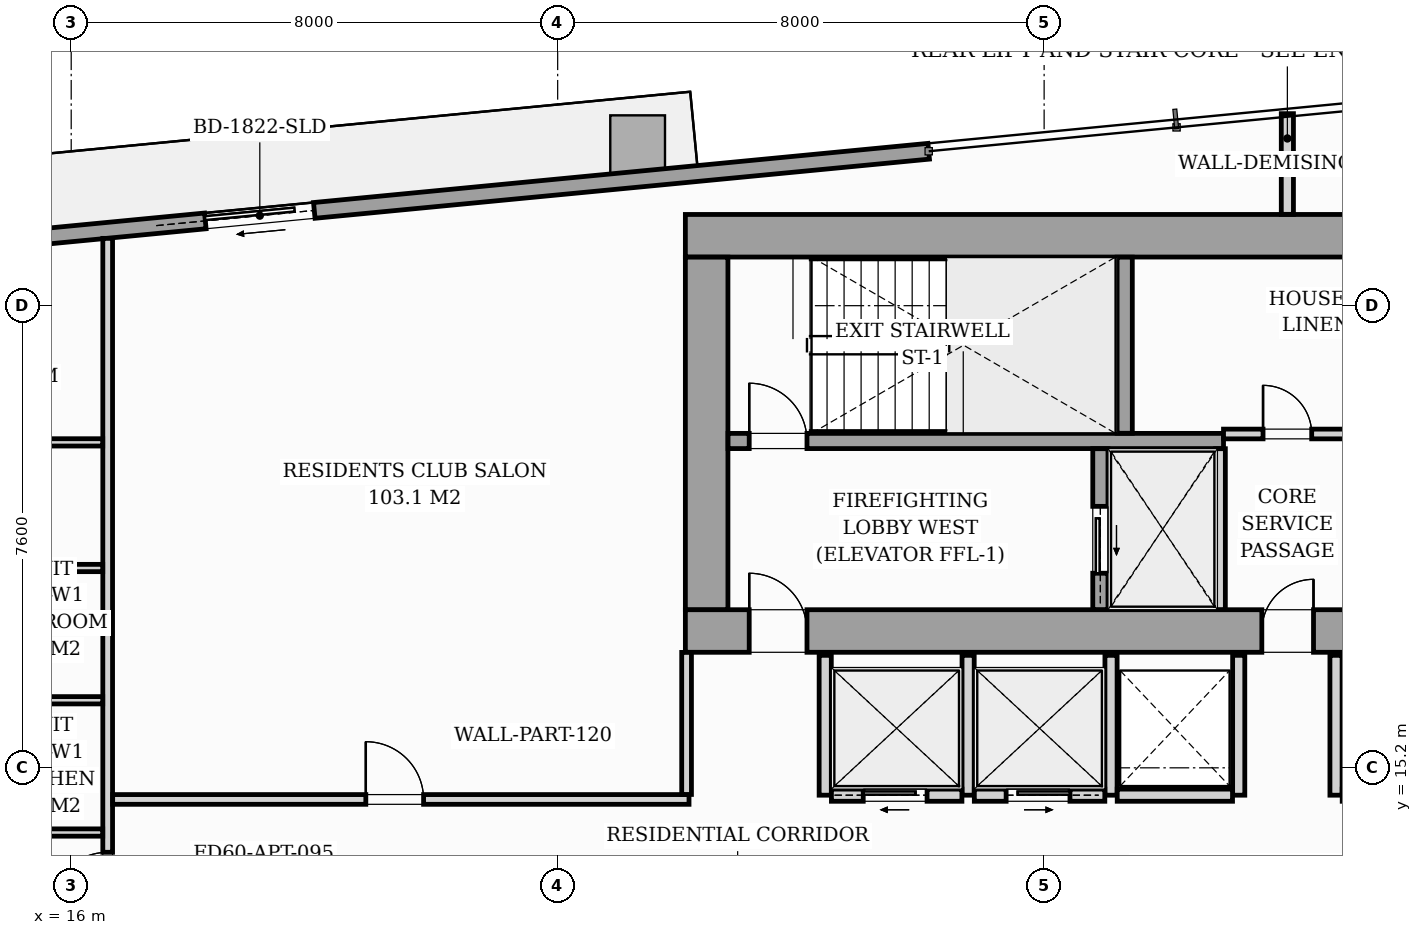
"""IFC4 building model, lengths in metres.
Left out: names, types, materials, properties, quantities, classifications, styles, units other than length and angle.
Written with IfcOpenShell. Run it as: python <this file> out.ifc"""

import sys

from ifc_helpers import new_model, si_unit, direction, frame, frame_2d, origin, origin_2d, place, context, subcontext, project, spatial, rectangle, i_section, extrude, source, transform, mapped, element, fill, save


model = new_model("IFC4")
c1 = context("Model", 3, precision=1e-05, world=origin(), true_north=direction((0.0, 1.0)))
c2 = subcontext(c1, "Body", "Model", "MODEL_VIEW")
j1 = project(units=[si_unit("LENGTHUNIT", "METRE"), si_unit("PLANEANGLEUNIT", "RADIAN")], contexts=[c1])
p1 = place(None, origin())
s1 = spatial("IfcSite", under=j1, at=p1, CompositionType="ELEMENT")
p2 = place(p1, origin())
s2 = spatial("IfcBuilding", under=s1, at=p2, CompositionType="ELEMENT")
p3 = place(p2, frame((0.0, 0.0, 81.0)))
s3 = spatial("IfcBuildingStorey", under=s2, at=p3, CompositionType="ELEMENT", Elevation=81.0)
m1 = source(origin(), c2, "Body", "SweptSolid", [
    extrude(i_section(OverallWidth=0.427, OverallDepth=0.483, WebThickness=0.051, FlangeThickness=0.082, FilletRadius=0.018, at=origin_2d()), origin(), (0.0, 0.0, 1.0), 3.196),
])
for number, where, z_axis, x_axis in (
    (1, (26.4, 17.4, 0.002), (0.0, 0.0, 1.0), (1.0, 0.0, 0.0)),
    (2, (33.12, 17.4, 0.002), (0.0, 0.0, 1.0), (1.0, 0.0, 0.0)),
    (3, (26.4, 24.0, 0.002), (0.0, 0.0, 1.0), (1.0, 0.0, 0.0)),
    (4, (33.12, 24.0, 0.002), (0.0, 0.0, 1.0), (1.0, 0.0, 0.0)),
):
    element("IfcColumn", number, at=place(p3, frame(where, z_axis=z_axis, x_axis=x_axis)), inside=s3, PredefinedType="PILASTER", context=c2, shape_type="MappedRepresentation", body=[
        mapped(m1, transform((0.0, 0.0, 0.0), scale=1.0)),
    ])
m2 = source(origin(), c2, "Body", "SweptSolid", [
    extrude(rectangle(XDim=0.9, YDim=1.1, at=origin_2d()), origin(), (0.0, 0.0, 1.0), 3.196),
])
p4 = place(p3, frame((25.315, 25.38, 0.002), z_axis=(0.0, 0.0, 1.0), x_axis=(0.995396198367, 0.09584575252, 0.0)))
e5 = element("IfcColumn", 5, at=p4, inside=s3, PredefinedType="COLUMN", context=c2, shape_type="MappedRepresentation", body=[
    mapped(m2, transform((0.0, 0.0, 0.0), scale=1.0)),
])
p5 = place(p3, frame((11.08, 23.508, 0.0), z_axis=(0.0, 0.0, 1.0), x_axis=(0.995396638587, 0.095841180552, 0.0)))
e6 = element("IfcWall", 6, at=p5, inside=s3, PredefinedType="STANDARD", context=c2, shape_type="SweptSolid", body=[
    extrude(rectangle(XDim=19.11, YDim=0.26, at=frame_2d((9.555, 0.0))), origin(), (0.0, 0.0, 1.0), 2.94),
])
p6 = place(p5, frame((7.159, 0.0, 0.0)))
e7 = element("IfcOpeningElement", 7, at=p6, cuts=e6, PredefinedType="OPENING", context=c2, shape_type="SweptSolid", body=[
    extrude(rectangle(XDim=1.8, YDim=2.06, at=frame_2d((0.9, 1.03))), frame((0.0, 0.14, 0.0), z_axis=(0.0, -1.0, 0.0), x_axis=(1.0, 0.0, 0.0)), (0.0, 0.0, 1.0), 0.28),
])
p7 = place(p5, frame((2.05, 0.0, 0.65)))
e8 = element("IfcOpeningElement", 8, at=p7, cuts=e6, PredefinedType="OPENING", context=c2, shape_type="SweptSolid", body=[
    extrude(rectangle(XDim=1.6, YDim=1.5, at=frame_2d((0.8, 0.75))), frame((0.0, 0.14, 0.0), z_axis=(0.0, -1.0, 0.0), x_axis=(1.0, 0.0, 0.0)), (0.0, 0.0, 1.0), 0.28),
])
p8 = place(p3, frame((26.1, 17.45, 0.0), z_axis=(0.0, 0.0, 1.0), x_axis=(1.0, 0.0, 0.0)))
e9 = element("IfcWall", 9, at=p8, inside=s3, PredefinedType="SHEAR", context=c2, shape_type="SweptSolid", body=[
    extrude(rectangle(XDim=19.8, YDim=0.7, at=frame_2d((9.9, 0.0))), origin(), (0.0, 0.0, 1.0), 3.2),
])
p9 = place(p8, frame((1.05, 0.0, 0.0)))
e10 = element("IfcOpeningElement", 10, at=p9, cuts=e9, PredefinedType="OPENING", context=c2, shape_type="SweptSolid", body=[
    extrude(rectangle(XDim=0.95, YDim=2.06, at=frame_2d((0.475, 1.03))), frame((0.0, 0.36, 0.0), z_axis=(0.0, -1.0, 0.0), x_axis=(1.0, 0.0, 0.0)), (0.0, 0.0, 1.0), 0.72),
])
p10 = place(p8, frame((9.48, 0.0, 0.0)))
e11 = element("IfcOpeningElement", 11, at=p10, cuts=e9, PredefinedType="OPENING", context=c2, shape_type="SweptSolid", body=[
    extrude(rectangle(XDim=0.85, YDim=2.0, at=frame_2d((0.425, 1.0))), frame((0.0, 0.36, 0.0), z_axis=(0.0, -1.0, 0.0), x_axis=(1.0, 0.0, 0.0)), (0.0, 0.0, 1.0), 0.72),
])
p11 = place(p8, frame((17.65, 0.0, 0.0)))
e12 = element("IfcOpeningElement", 12, at=p11, cuts=e9, PredefinedType="OPENING", context=c2, shape_type="SweptSolid", body=[
    extrude(rectangle(XDim=0.95, YDim=2.06, at=frame_2d((0.475, 1.03))), frame((0.0, 0.36, 0.0), z_axis=(0.0, -1.0, 0.0), x_axis=(1.0, 0.0, 0.0)), (0.0, 0.0, 1.0), 0.72),
])
p12 = place(p3, frame((26.1, 23.95, 0.0), z_axis=(0.0, 0.0, 1.0), x_axis=(1.0, 0.0, 0.0)))
e13 = element("IfcWall", 13, at=p12, inside=s3, PredefinedType="SHEAR", context=c2, shape_type="SweptSolid", body=[
    extrude(rectangle(XDim=19.8, YDim=0.7, at=frame_2d((9.9, 0.0))), origin(), (0.0, 0.0, 1.0), 3.2),
])
p13 = place(p3, frame((26.45, 17.802, 0.0), z_axis=(0.0, 0.0, 1.0), x_axis=(0.0, 1.0, 0.0)))
e14 = element("IfcWall", 14, at=p13, inside=s3, PredefinedType="SHEAR", context=c2, shape_type="SweptSolid", body=[
    extrude(rectangle(XDim=5.796, YDim=0.7, at=frame_2d((2.898, 0.0))), origin(), (0.0, 0.0, 1.0), 3.2),
])
p14 = place(p3, frame((26.802, 20.575, 0.0), z_axis=(0.0, 0.0, 1.0), x_axis=(1.0, 0.0, 0.0)))
e15 = element("IfcWall", 15, at=p14, inside=s3, PredefinedType="SOLIDWALL", context=c2, shape_type="SweptSolid", body=[
    extrude(rectangle(XDim=8.148, YDim=0.25, at=frame_2d((4.074, 0.0))), origin(), (0.0, 0.0, 1.0), 3.2),
])
p15 = place(p14, frame((0.348, 0.0, 0.0)))
e16 = element("IfcOpeningElement", 16, at=p15, cuts=e15, PredefinedType="OPENING", context=c2, shape_type="SweptSolid", body=[
    extrude(rectangle(XDim=0.95, YDim=2.06, at=frame_2d((0.475, 1.03))), frame((0.0, 0.135, 0.0), z_axis=(0.0, -1.0, 0.0), x_axis=(1.0, 0.0, 0.0)), (0.0, 0.0, 1.0), 0.27),
])
p16 = place(p3, frame((33.325, 20.702, 0.0), z_axis=(0.0, 0.0, 1.0), x_axis=(0.0, 1.0, 0.0)))
e17 = element("IfcWall", 17, at=p16, inside=s3, PredefinedType="SOLIDWALL", context=c2, shape_type="SweptSolid", body=[
    extrude(rectangle(XDim=2.896, YDim=0.25, at=frame_2d((1.448, 0.0))), origin(), (0.0, 0.0, 1.0), 3.2),
])
p17 = place(p3, frame((32.925, 17.802, 0.0), z_axis=(0.0, 0.0, 1.0), x_axis=(0.0, 1.0, 0.0)))
e18 = element("IfcWall", 18, at=p17, inside=s3, PredefinedType="SOLIDWALL", context=c2, shape_type="SweptSolid", body=[
    extrude(rectangle(XDim=2.646, YDim=0.25, at=frame_2d((1.323, 0.0))), origin(), (0.0, 0.0, 1.0), 3.2),
])
p18 = place(p17, frame((0.598, 0.0, 0.0)))
e19 = element("IfcOpeningElement", 19, at=p18, cuts=e18, PredefinedType="OPENING", context=c2, shape_type="SweptSolid", body=[
    extrude(rectangle(XDim=1.1, YDim=2.08, at=frame_2d((0.55, 1.04))), frame((0.0, 0.135, 0.0), z_axis=(0.0, -1.0, 0.0), x_axis=(1.0, 0.0, 0.0)), (0.0, 0.0, 1.0), 0.27),
])
p19 = place(p3, frame((34.9, 17.802, 0.0), z_axis=(0.0, 0.0, 1.0), x_axis=(0.0, 1.0, 0.0)))
e20 = element("IfcWall", 20, at=p19, inside=s3, PredefinedType="PARTITIONING", context=c2, shape_type="SweptSolid", body=[
    extrude(rectangle(XDim=2.646, YDim=0.16, at=frame_2d((1.323, 0.0))), origin(), (0.0, 0.0, 1.0), 2.94),
])
p20 = place(p3, frame((34.95, 20.69, 0.0), z_axis=(0.0, 0.0, 1.0), x_axis=(1.0, 0.0, 0.0)))
e21 = element("IfcWall", 21, at=p20, inside=s3, PredefinedType="PARTITIONING", context=c2, shape_type="SweptSolid", body=[
    extrude(rectangle(XDim=2.1, YDim=0.16, at=frame_2d((1.05, 0.0))), origin(), (0.0, 0.0, 1.0), 2.94),
])
p21 = place(p20, frame((0.65, 0.0, 0.0)))
e22 = element("IfcOpeningElement", 22, at=p21, cuts=e21, PredefinedType="OPENING", context=c2, shape_type="SweptSolid", body=[
    extrude(rectangle(XDim=0.8, YDim=2.05, at=frame_2d((0.4, 1.025))), frame((0.0, 0.09, 0.0), z_axis=(0.0, -1.0, 0.0), x_axis=(1.0, 0.0, 0.0)), (0.0, 0.0, 1.0), 0.18),
])
for number, where, z_axis, x_axis in (
    (23, (28.4, 14.75, 0.0), (0.0, 0.0, 1.0), (0.0, 1.0, 0.0)),
    (24, (30.75, 14.75, 0.0), (0.0, 0.0, 1.0), (0.0, 1.0, 0.0)),
    (25, (33.1, 14.75, 0.0), (0.0, 0.0, 1.0), (0.0, 1.0, 0.0)),
):
    element("IfcWall", number, at=place(p3, frame(where, z_axis=z_axis, x_axis=x_axis)), inside=s3, PredefinedType="PARTITIONING", context=c2, shape_type="SweptSolid", body=[
        extrude(rectangle(XDim=2.3, YDim=0.2, at=frame_2d((1.15, 0.0))), origin(), (0.0, 0.0, 1.0), 2.94),
    ])
p22 = place(p3, frame((28.502, 14.75, 0.0), z_axis=(0.0, 0.0, 1.0), x_axis=(1.0, 0.0, 0.0)))
e26 = element("IfcWall", 26, at=p22, inside=s3, PredefinedType="PARTITIONING", context=c2, shape_type="SweptSolid", body=[
    extrude(rectangle(XDim=2.146, YDim=0.2, at=frame_2d((1.073, 0.0))), origin(), (0.0, 0.0, 1.0), 2.94),
])
p23 = place(p22, frame((0.523, 0.0, 0.0)))
e27 = element("IfcOpeningElement", 27, at=p23, cuts=e26, PredefinedType="OPENING", context=c2, shape_type="SweptSolid", body=[
    extrude(rectangle(XDim=1.05, YDim=2.08, at=frame_2d((0.525, 1.04))), frame((0.0, 0.11, 0.0), z_axis=(0.0, -1.0, 0.0), x_axis=(1.0, 0.0, 0.0)), (0.0, 0.0, 1.0), 0.22),
])
p24 = place(p3, frame((30.852, 14.75, 0.0), z_axis=(0.0, 0.0, 1.0), x_axis=(1.0, 0.0, 0.0)))
e28 = element("IfcWall", 28, at=p24, inside=s3, PredefinedType="PARTITIONING", context=c2, shape_type="SweptSolid", body=[
    extrude(rectangle(XDim=2.146, YDim=0.2, at=frame_2d((1.073, 0.0))), origin(), (0.0, 0.0, 1.0), 2.94),
])
p25 = place(p24, frame((0.523, 0.0, 0.0)))
e29 = element("IfcOpeningElement", 29, at=p25, cuts=e28, PredefinedType="OPENING", context=c2, shape_type="SweptSolid", body=[
    extrude(rectangle(XDim=1.05, YDim=2.08, at=frame_2d((0.525, 1.04))), frame((0.0, 0.11, 0.0), z_axis=(0.0, -1.0, 0.0), x_axis=(1.0, 0.0, 0.0)), (0.0, 0.0, 1.0), 0.22),
])
p26 = place(p3, frame((35.2, 14.75, 0.0), z_axis=(0.0, 0.0, 1.0), x_axis=(0.0, 1.0, 0.0)))
e30 = element("IfcWall", 30, at=p26, inside=s3, PredefinedType="PARTITIONING", context=c2, shape_type="SweptSolid", body=[
    extrude(rectangle(XDim=2.3, YDim=0.2, at=frame_2d((1.15, 0.0))), origin(), (0.0, 0.0, 1.0), 2.94),
])
p27 = place(p3, frame((33.202, 14.75, 0.0), z_axis=(0.0, 0.0, 1.0), x_axis=(1.0, 0.0, 0.0)))
e31 = element("IfcWall", 31, at=p27, inside=s3, PredefinedType="PARTITIONING", context=c2, shape_type="SweptSolid", body=[
    extrude(rectangle(XDim=1.896, YDim=0.2, at=frame_2d((0.948, 0.0))), origin(), (0.0, 0.0, 1.0), 2.94),
])
p28 = place(p3, frame((36.8, 14.75, 0.0), z_axis=(0.0, 0.0, 1.0), x_axis=(0.0, 1.0, 0.0)))
e32 = element("IfcWall", 32, at=p28, inside=s3, PredefinedType="PARTITIONING", context=c2, shape_type="SweptSolid", body=[
    extrude(rectangle(XDim=2.3, YDim=0.2, at=frame_2d((1.15, 0.0))), origin(), (0.0, 0.0, 1.0), 2.94),
])
p29 = place(p3, frame((16.6, 12.432, 0.0), z_axis=(0.0, 0.0, 1.0), x_axis=(0.0, 1.0, 0.0)))
e33 = element("IfcWall", 33, at=p29, inside=s3, PredefinedType="PARTITIONING", context=c2, shape_type="SweptSolid", body=[
    extrude(rectangle(XDim=11.475, YDim=0.16, at=frame_2d((5.738, 0.0))), origin(), (0.0, 0.0, 1.0), 2.94),
])
p30 = place(p29, frame((0.429, 0.0, 0.0)))
e34 = element("IfcOpeningElement", 34, at=p30, cuts=e33, PredefinedType="OPENING", context=c2, shape_type="SweptSolid", body=[
    extrude(rectangle(XDim=0.95, YDim=2.06, at=frame_2d((0.475, 1.03))), frame((0.0, 0.09, 0.0), z_axis=(0.0, -1.0, 0.0), x_axis=(1.0, 0.0, 0.0)), (0.0, 0.0, 1.0), 0.18),
])
p31 = place(p3, frame((36.0, 24.302, 0.0), z_axis=(0.0, 0.0, 1.0), x_axis=(0.0, 1.0, 0.0)))
e35 = element("IfcWall", 35, at=p31, inside=s3, PredefinedType="PARTITIONING", context=c2, shape_type="SweptSolid", body=[
    extrude(rectangle(XDim=1.656, YDim=0.2, at=frame_2d((0.828, 0.0))), origin(), (0.0, 0.0, 1.0), 2.94),
])
for number, where, z_axis, x_axis in (
    (36, (14.262, 16.311, 0.0), (0.0, 0.0, 1.0), (1.0, 0.0, 0.0)),
    (37, (14.262, 14.136, 0.0), (0.0, 0.0, 1.0), (1.0, 0.0, 0.0)),
    (38, (14.262, 18.486, 0.0), (0.0, 0.0, 1.0), (1.0, 0.0, 0.0)),
):
    element("IfcWall", number, at=place(p3, frame(where, z_axis=z_axis, x_axis=x_axis)), inside=s3, PredefinedType="PARTITIONING", context=c2, shape_type="SweptSolid", body=[
        extrude(rectangle(XDim=2.256, YDim=0.12, at=frame_2d((1.128, 0.0))), origin(), (0.0, 0.0, 1.0), 2.94),
    ])
p32 = place(p3, frame((8.933, 20.552, 0.0), z_axis=(0.0, 0.0, 1.0), x_axis=(1.0, 0.0, 0.0)))
e39 = element("IfcWall", 39, at=p32, inside=s3, PredefinedType="PARTITIONING", context=c2, shape_type="SweptSolid", body=[
    extrude(rectangle(XDim=7.585, YDim=0.12, at=frame_2d((3.792, 0.0))), origin(), (0.0, 0.0, 1.0), 2.94),
])
p33 = place(p32, frame((3.944, 0.0, 0.0)))
e40 = element("IfcOpeningElement", 40, at=p33, cuts=e39, PredefinedType="OPENING", context=c2, shape_type="SweptSolid", body=[
    extrude(rectangle(XDim=0.55, YDim=2.0, at=frame_2d((0.275, 1.0))), frame((0.0, 0.07, 0.0), z_axis=(0.0, -1.0, 0.0), x_axis=(1.0, 0.0, 0.0)), (0.0, 0.0, 1.0), 0.14),
])
p34 = place(p3, frame((16.682, 14.68, 0.0), z_axis=(0.0, 0.0, 1.0), x_axis=(1.0, 0.0, 0.0)))
e41 = element("IfcWall", 41, at=p34, inside=s3, PredefinedType="PARTITIONING", context=c2, shape_type="SweptSolid", body=[
    extrude(rectangle(XDim=9.478, YDim=0.16, at=frame_2d((4.739, 0.0))), origin(), (0.0, 0.0, 1.0), 2.94),
])
p35 = place(p34, frame((4.163, 0.0, 0.0)))
e42 = element("IfcOpeningElement", 42, at=p35, cuts=e41, PredefinedType="OPENING", context=c2, shape_type="SweptSolid", body=[
    extrude(rectangle(XDim=0.95, YDim=2.06, at=frame_2d((0.475, 1.03))), frame((0.0, 0.09, 0.0), z_axis=(0.0, -1.0, 0.0), x_axis=(1.0, 0.0, 0.0)), (0.0, 0.0, 1.0), 0.18),
])
p36 = place(p3, frame((26.12, 14.762, 0.0), z_axis=(0.0, 0.0, 1.0), x_axis=(0.0, 1.0, 0.0)))
e43 = element("IfcWall", 43, at=p36, inside=s3, PredefinedType="PARTITIONING", context=c2, shape_type="SweptSolid", body=[
    extrude(rectangle(XDim=2.336, YDim=0.16, at=frame_2d((1.168, 0.0))), origin(), (0.0, 0.0, 1.0), 2.94),
])
m3 = source(origin(), c2, "Body", "SweptSolid", [
    extrude(rectangle(XDim=1.8, YDim=2.06, at=frame_2d((0.9, 1.03))), frame((0.0, 0.025, 0.0), z_axis=(0.0, -1.0, 0.0), x_axis=(1.0, 0.0, 0.0)), (0.0, 0.0, 1.0), 0.05),
])
p37 = place(p6, origin())
e44 = element("IfcDoor", 44, at=p37, inside=s3, OperationType="SLIDING_TO_LEFT", PredefinedType="DOOR", context=c2, shape_type="MappedRepresentation", body=[
    mapped(m3, transform((0.0, 0.0, 0.0), scale=1.0)),
])
fill(e7, e44)
m4 = source(origin(), c2, "Body", "SweptSolid", [
    extrude(rectangle(XDim=0.95, YDim=2.06, at=frame_2d((0.475, 1.03))), frame((0.0, 0.025, 0.0), z_axis=(0.0, -1.0, 0.0), x_axis=(1.0, 0.0, 0.0)), (0.0, 0.0, 1.0), 0.05),
])
p38 = place(p9, origin())
e45 = element("IfcDoor", 45, at=p38, inside=s3, OperationType="SINGLE_SWING_LEFT", PredefinedType="DOOR", context=c2, shape_type="MappedRepresentation", body=[
    mapped(m4, transform((0.0, 0.0, 0.0), scale=1.0)),
])
fill(e10, e45)
m5 = source(origin(), c2, "Body", "SweptSolid", [
    extrude(rectangle(XDim=0.85, YDim=2.0, at=frame_2d((0.425, 1.0))), frame((0.0, 0.025, 0.0), z_axis=(0.0, -1.0, 0.0), x_axis=(1.0, 0.0, 0.0)), (0.0, 0.0, 1.0), 0.05),
])
p39 = place(p10, origin())
e46 = element("IfcDoor", 46, at=p39, inside=s3, OperationType="SINGLE_SWING_RIGHT", PredefinedType="DOOR", context=c2, shape_type="MappedRepresentation", body=[
    mapped(m5, transform((0.0, 0.0, 0.0), scale=1.0)),
])
fill(e11, e46)
p40 = place(p15, origin())
e47 = element("IfcDoor", 47, at=p40, inside=s3, OperationType="SINGLE_SWING_LEFT", PredefinedType="DOOR", context=c2, shape_type="MappedRepresentation", body=[
    mapped(m4, transform((0.0, 0.0, 0.0), scale=1.0)),
])
fill(e16, e47)
m6 = source(origin(), c2, "Body", "SweptSolid", [
    extrude(rectangle(XDim=1.1, YDim=2.08, at=frame_2d((0.55, 1.04))), frame((0.0, 0.025, 0.0), z_axis=(0.0, -1.0, 0.0), x_axis=(1.0, 0.0, 0.0)), (0.0, 0.0, 1.0), 0.05),
])
p41 = place(p18, origin())
e48 = element("IfcDoor", 48, at=p41, inside=s3, OperationType="SLIDING_TO_LEFT", PredefinedType="DOOR", context=c2, shape_type="MappedRepresentation", body=[
    mapped(m6, transform((0.0, 0.0, 0.0), scale=1.0)),
])
fill(e19, e48)
m7 = source(origin(), c2, "Body", "SweptSolid", [
    extrude(rectangle(XDim=0.8, YDim=2.05, at=frame_2d((0.4, 1.025))), frame((0.0, 0.025, 0.0), z_axis=(0.0, -1.0, 0.0), x_axis=(1.0, 0.0, 0.0)), (0.0, 0.0, 1.0), 0.05),
])
p42 = place(p21, origin())
e49 = element("IfcDoor", 49, at=p42, inside=s3, OperationType="SINGLE_SWING_LEFT", PredefinedType="DOOR", context=c2, shape_type="MappedRepresentation", body=[
    mapped(m7, transform((0.0, 0.0, 0.0), scale=1.0)),
])
fill(e22, e49)
m8 = source(origin(), c2, "Body", "SweptSolid", [
    extrude(rectangle(XDim=1.05, YDim=2.08, at=frame_2d((0.525, 1.04))), frame((0.0, 0.025, 0.0), z_axis=(0.0, -1.0, 0.0), x_axis=(1.0, 0.0, 0.0)), (0.0, 0.0, 1.0), 0.05),
])
p43 = place(p23, origin())
e50 = element("IfcDoor", 50, at=p43, inside=s3, OperationType="SLIDING_TO_LEFT", PredefinedType="DOOR", context=c2, shape_type="MappedRepresentation", body=[
    mapped(m8, transform((0.0, 0.0, 0.0), scale=1.0)),
])
fill(e27, e50)
p44 = place(p25, origin())
e51 = element("IfcDoor", 51, at=p44, inside=s3, OperationType="SLIDING_TO_RIGHT", PredefinedType="DOOR", context=c2, shape_type="MappedRepresentation", body=[
    mapped(m8, transform((0.0, 0.0, 0.0), scale=1.0)),
])
fill(e29, e51)
m9 = source(origin(), c2, "Body", "SweptSolid", [
    extrude(rectangle(XDim=0.95, YDim=2.06, at=frame_2d((0.475, 1.03))), frame((0.0, 0.025, 0.0), z_axis=(0.0, -1.0, 0.0), x_axis=(1.0, 0.0, 0.0)), (0.0, 0.0, 1.0), 0.05),
])
p45 = place(p30, origin())
e52 = element("IfcDoor", 52, at=p45, inside=s3, OperationType="SINGLE_SWING_LEFT", PredefinedType="DOOR", context=c2, shape_type="MappedRepresentation", body=[
    mapped(m9, transform((0.0, 0.0, 0.0), scale=1.0)),
])
fill(e34, e52)
p46 = place(p35, origin())
e53 = element("IfcDoor", 53, at=p46, inside=s3, OperationType="SINGLE_SWING_LEFT", PredefinedType="DOOR", context=c2, shape_type="MappedRepresentation", body=[
    mapped(m9, transform((0.0, 0.0, 0.0), scale=1.0)),
])
fill(e42, e53)
save(model, sys.argv[1])
